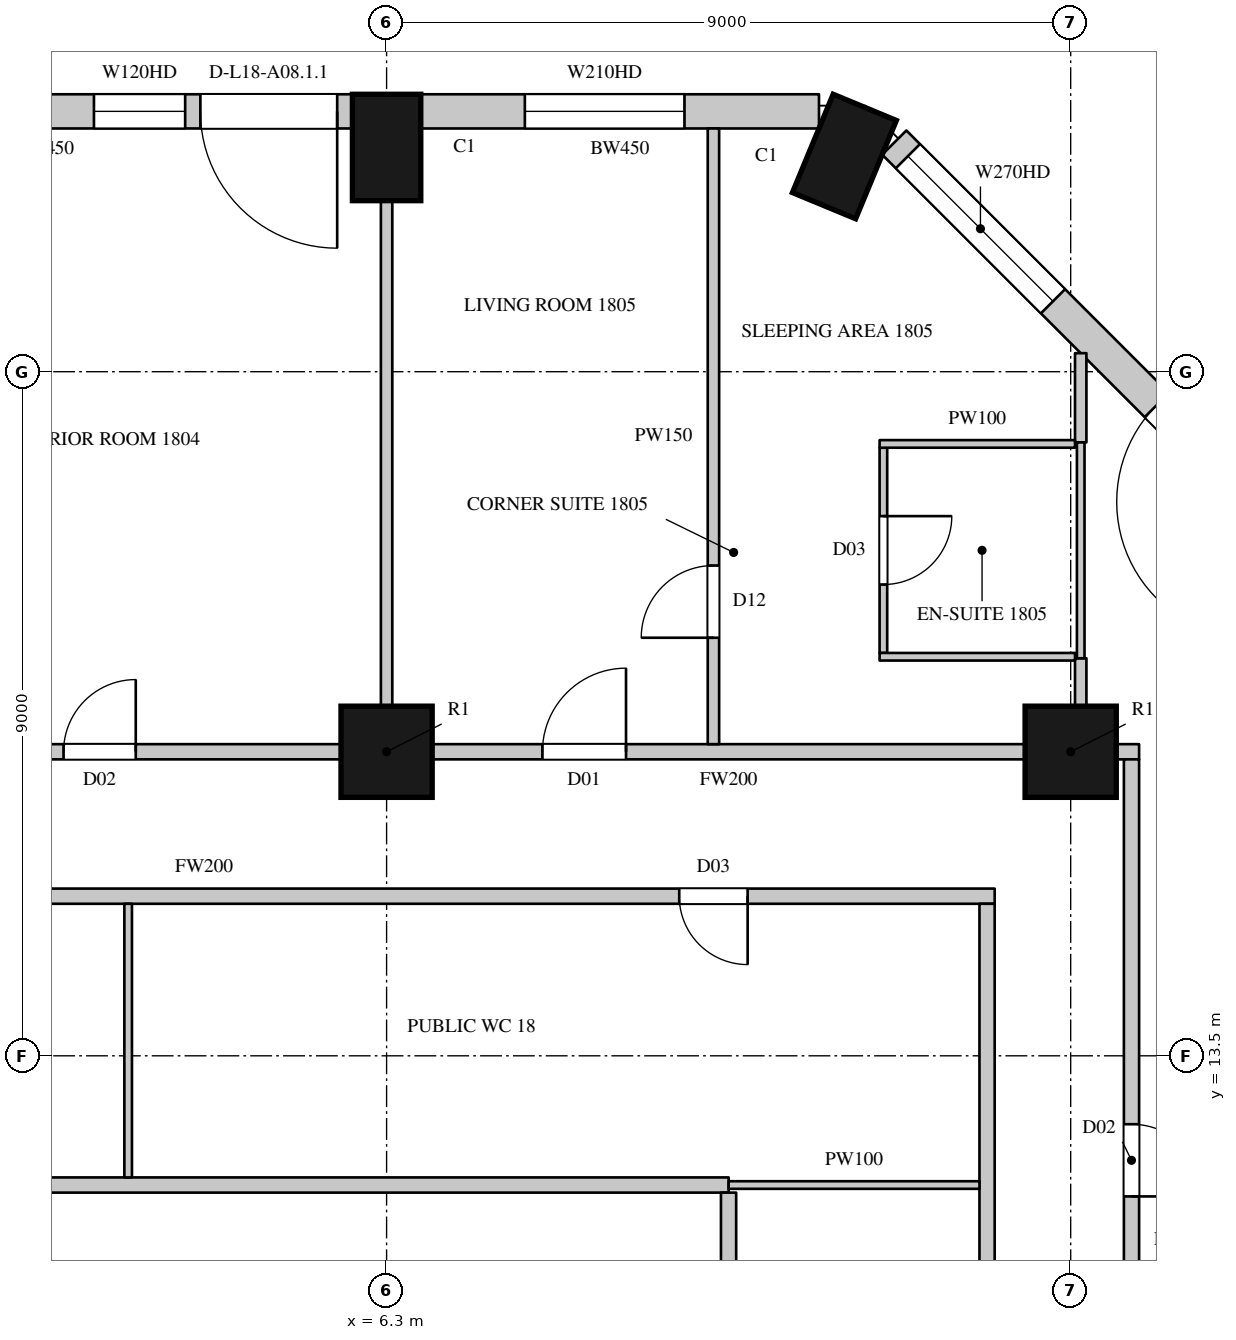
"""IFC4 building model, lengths in metres.
Left out: names, types, materials, properties, quantities, classifications, styles, units other than length and angle.
Written with IfcOpenShell. Run it as: python <this file> out.ifc"""

import sys

from ifc_helpers import new_model, si_unit, direction, frame, frame_2d, origin, origin_2d, place, context, subcontext, project, spatial, rectangle, circle, extrude, element, fill, save


model = new_model("IFC4")
c1 = context("Model", 3, precision=1e-05, world=origin(), true_north=direction((0.0, 1.0)))
c2 = subcontext(c1, "Body", "Model", "MODEL_VIEW")
j1 = project(units=[si_unit("LENGTHUNIT", "METRE"), si_unit("PLANEANGLEUNIT", "RADIAN")], contexts=[c1])
p1 = place(None, origin())
s1 = spatial("IfcSite", under=j1, at=p1, CompositionType="ELEMENT")
p2 = place(p1, origin())
s2 = spatial("IfcBuilding", under=s1, at=p2, CompositionType="ELEMENT")
p3 = place(p2, frame((0.0, 0.0, 95.1)))
s3 = spatial("IfcBuildingStorey", under=s2, at=p3, CompositionType="ELEMENT", Elevation=95.1)
for number, where, z_axis, x_axis in (
    (1, (12.323, 25.331, 0.0), (0.0, 0.0, 1.0), (-0.924, 0.383, 0.0)),
    (2, (6.3, 25.45, 0.0), (0.0, 0.0, 1.0), (-1.0, 0.0, 0.0)),
):
    element("IfcColumn", number, at=place(p3, frame(where, z_axis=z_axis, x_axis=x_axis)), inside=s3, PredefinedType="COLUMN", context=c2, shape_type="SweptSolid", body=[
        extrude(rectangle(XDim=0.9, YDim=1.4, at=origin_2d()), origin(), (0.0, 0.0, 1.0), 3.6),
    ])
for number, where, z_axis, x_axis in (
    (3, (6.3, 17.5, 0.0), (0.0, 0.0, 1.0), (1.0, 0.0, 0.0)),
    (4, (15.3, 17.5, 0.0), (0.0, 0.0, 1.0), (1.0, 0.0, 0.0)),
):
    element("IfcColumn", number, at=place(p3, frame(where, z_axis=z_axis, x_axis=x_axis)), inside=s3, PredefinedType="COLUMN", context=c2, shape_type="SweptSolid", body=[
        extrude(circle(Radius=0.6, at=origin_2d()), origin(), (0.0, 0.0, 1.0), 3.6),
    ])
p4 = place(p3, frame((18.229, 20.265, 0.0), z_axis=(0.0, 0.0, 1.0), x_axis=(-0.707106781187, 0.707106781187, 0.0)))
e5 = element("IfcWall", 5, at=p4, inside=s3, PredefinedType="SOLIDWALL", context=c2, shape_type="SweptSolid", body=[
    extrude(rectangle(XDim=7.424, YDim=0.45, at=frame_2d((3.712, 0.0))), origin(), (0.0, 0.0, 1.0), 3.3),
])
p5 = place(p4, frame((0.74, 0.0, 0.0)))
e6 = element("IfcOpeningElement", 6, at=p5, cuts=e5, PredefinedType="OPENING", context=c2, shape_type="SweptSolid", body=[
    extrude(rectangle(XDim=1.8, YDim=2.4, at=frame_2d((0.9, 1.2))), frame((0.0, 0.235, 0.0), z_axis=(0.0, -1.0, 0.0), x_axis=(1.0, 0.0, 0.0)), (0.0, 0.0, 1.0), 0.47),
])
p6 = place(p4, frame((4.471, 0.0, 1.05)))
e7 = element("IfcOpeningElement", 7, at=p6, cuts=e5, PredefinedType="OPENING", context=c2, shape_type="SweptSolid", body=[
    extrude(rectangle(XDim=2.7, YDim=2.0, at=frame_2d((1.35, 1.0))), frame((0.0, 0.235, 0.0), z_axis=(0.0, -1.0, 0.0), x_axis=(1.0, 0.0, 0.0)), (0.0, 0.0, 1.0), 0.47),
])
p7 = place(p3, frame((11.989, 25.925, 0.0), z_axis=(0.0, 0.0, 1.0), x_axis=(-1.0, 0.0, 0.0)))
e8 = element("IfcWall", 8, at=p7, inside=s3, PredefinedType="SOLIDWALL", context=c2, shape_type="SweptSolid", body=[
    extrude(rectangle(XDim=5.239, YDim=0.45, at=frame_2d((2.619, 0.0))), origin(), (0.0, 0.0, 1.0), 3.3),
])
p8 = place(p7, frame((1.77, 0.0, 1.05)))
e9 = element("IfcOpeningElement", 9, at=p8, cuts=e8, PredefinedType="OPENING", context=c2, shape_type="SweptSolid", body=[
    extrude(rectangle(XDim=2.1, YDim=2.0, at=frame_2d((1.05, 1.0))), frame((0.0, 0.235, 0.0), z_axis=(0.0, -1.0, 0.0), x_axis=(1.0, 0.0, 0.0)), (0.0, 0.0, 1.0), 0.47),
])
p9 = place(p3, frame((5.85, 25.925, 0.0), z_axis=(0.0, 0.0, 1.0), x_axis=(-1.0, 0.0, 0.0)))
e10 = element("IfcWall", 10, at=p9, inside=s3, PredefinedType="SOLIDWALL", context=c2, shape_type="SweptSolid", body=[
    extrude(rectangle(XDim=8.1, YDim=0.45, at=frame_2d((4.05, 0.0))), origin(), (0.0, 0.0, 1.0), 3.3),
])
p10 = place(p9, frame((0.2, 0.0, 0.0)))
e11 = element("IfcOpeningElement", 11, at=p10, cuts=e10, PredefinedType="OPENING", context=c2, shape_type="SweptSolid", body=[
    extrude(rectangle(XDim=1.8, YDim=2.4, at=frame_2d((0.9, 1.2))), frame((0.0, 0.235, 0.0), z_axis=(0.0, -1.0, 0.0), x_axis=(1.0, 0.0, 0.0)), (0.0, 0.0, 1.0), 0.47),
])
p11 = place(p9, frame((2.2, 0.0, 1.05)))
e12 = element("IfcOpeningElement", 12, at=p11, cuts=e10, PredefinedType="OPENING", context=c2, shape_type="SweptSolid", body=[
    extrude(rectangle(XDim=1.2, YDim=2.0, at=frame_2d((0.6, 1.0))), frame((0.0, 0.235, 0.0), z_axis=(0.0, -1.0, 0.0), x_axis=(1.0, 0.0, 0.0)), (0.0, 0.0, 1.0), 0.47),
])
p12 = place(p9, frame((4.7, 0.0, 0.0)))
e13 = element("IfcOpeningElement", 13, at=p12, cuts=e10, PredefinedType="OPENING", context=c2, shape_type="SweptSolid", body=[
    extrude(rectangle(XDim=1.8, YDim=2.4, at=frame_2d((0.9, 1.2))), frame((0.0, 0.235, 0.0), z_axis=(0.0, -1.0, 0.0), x_axis=(1.0, 0.0, 0.0)), (0.0, 0.0, 1.0), 0.47),
])
p13 = place(p9, frame((6.7, 0.0, 1.05)))
e14 = element("IfcOpeningElement", 14, at=p13, cuts=e10, PredefinedType="OPENING", context=c2, shape_type="SweptSolid", body=[
    extrude(rectangle(XDim=1.2, YDim=2.0, at=frame_2d((0.6, 1.0))), frame((0.0, 0.235, 0.0), z_axis=(0.0, -1.0, 0.0), x_axis=(1.0, 0.0, 0.0)), (0.0, 0.0, 1.0), 0.47),
])
p14 = place(p3, frame((16.486, 23.529, 0.0), z_axis=(0.0, 0.0, 1.0), x_axis=(-0.707022305137, 0.707191247145, 0.0)))
e15 = element("IfcWall", 15, at=p14, inside=s3, PredefinedType="SOLIDWALL", context=c2, shape_type="SweptSolid", body=[
    extrude(rectangle(XDim=1.445, YDim=0.45, at=frame_2d((0.723, 0.0))), origin(), (0.0, 0.0, 1.0), 0.6),
])
p15 = place(p3, frame((-2.1, 17.5, 0.0), z_axis=(0.0, 0.0, 1.0), x_axis=(1.0, 0.0, 0.0)))
e16 = element("IfcWall", 16, at=p15, inside=s3, PredefinedType="PARTITIONING", context=c2, shape_type="SweptSolid", body=[
    extrude(rectangle(XDim=7.8, YDim=0.2, at=frame_2d((3.9, 0.0))), origin(), (0.0, 0.0, 1.0), 2.75),
])
p16 = place(p15, frame((4.15, 0.0, 0.0)))
e17 = element("IfcOpeningElement", 17, at=p16, cuts=e16, PredefinedType="OPENING", context=c2, shape_type="SweptSolid", body=[
    extrude(rectangle(XDim=0.95, YDim=2.2, at=frame_2d((0.475, 1.1))), frame((0.0, 0.11, 0.0), z_axis=(0.0, -1.0, 0.0), x_axis=(1.0, 0.0, 0.0)), (0.0, 0.0, 1.0), 0.22),
])
p17 = place(p3, frame((6.9, 17.5, 0.0), z_axis=(0.0, 0.0, 1.0), x_axis=(1.0, 0.0, 0.0)))
e18 = element("IfcWall", 18, at=p17, inside=s3, PredefinedType="PARTITIONING", context=c2, shape_type="SweptSolid", body=[
    extrude(rectangle(XDim=7.8, YDim=0.2, at=frame_2d((3.9, 0.0))), origin(), (0.0, 0.0, 1.0), 2.75),
])
p18 = place(p17, frame((1.45, 0.0, 0.0)))
e19 = element("IfcOpeningElement", 19, at=p18, cuts=e18, PredefinedType="OPENING", context=c2, shape_type="SweptSolid", body=[
    extrude(rectangle(XDim=1.1, YDim=2.4, at=frame_2d((0.55, 1.2))), frame((0.0, 0.11, 0.0), z_axis=(0.0, -1.0, 0.0), x_axis=(1.0, 0.0, 0.0)), (0.0, 0.0, 1.0), 0.22),
])
p19 = place(p3, frame((15.9, 17.5, 0.0), z_axis=(0.0, 0.0, 1.0), x_axis=(1.0, 0.0, 0.0)))
e20 = element("IfcWall", 20, at=p19, inside=s3, PredefinedType="PARTITIONING", context=c2, shape_type="SweptSolid", body=[
    extrude(rectangle(XDim=0.3, YDim=0.2, at=frame_2d((0.15, 0.0))), origin(), (0.0, 0.0, 1.0), 3.3),
])
p20 = place(p3, frame((-8.9, 11.8, 0.0), z_axis=(0.0, 0.0, 1.0), x_axis=(1.0, 0.0, 0.0)))
e21 = element("IfcWall", 21, at=p20, inside=s3, PredefinedType="PARTITIONING", context=c2, shape_type="SweptSolid", body=[
    extrude(rectangle(XDim=19.7, YDim=0.2, at=frame_2d((9.85, 0.0))), origin(), (0.0, 0.0, 1.0), 3.3),
])
p21 = place(p20, frame((0.8, 0.0, 0.0)))
e22 = element("IfcOpeningElement", 22, at=p21, cuts=e21, PredefinedType="OPENING", context=c2, shape_type="SweptSolid", body=[
    extrude(rectangle(XDim=1.5, YDim=2.2, at=frame_2d((0.75, 1.1))), frame((0.0, 0.11, 0.0), z_axis=(0.0, -1.0, 0.0), x_axis=(1.0, 0.0, 0.0)), (0.0, 0.0, 1.0), 0.22),
])
p22 = place(p3, frame((-6.5, 15.6, 0.0), z_axis=(0.0, 0.0, 1.0), x_axis=(1.0, 0.0, 0.0)))
e23 = element("IfcWall", 23, at=p22, inside=s3, PredefinedType="PARTITIONING", context=c2, shape_type="SweptSolid", body=[
    extrude(rectangle(XDim=20.8, YDim=0.2, at=frame_2d((10.4, 0.0))), origin(), (0.0, 0.0, 1.0), 3.3),
])
p23 = place(p22, frame((6.5, 0.0, 0.0)))
e24 = element("IfcOpeningElement", 24, at=p23, cuts=e23, PredefinedType="OPENING", context=c2, shape_type="SweptSolid", body=[
    extrude(rectangle(XDim=0.9, YDim=2.2, at=frame_2d((0.45, 1.1))), frame((0.0, 0.11, 0.0), z_axis=(0.0, -1.0, 0.0), x_axis=(1.0, 0.0, 0.0)), (0.0, 0.0, 1.0), 0.22),
])
p24 = place(p22, frame((16.65, 0.0, 0.0)))
e25 = element("IfcOpeningElement", 25, at=p24, cuts=e23, PredefinedType="OPENING", context=c2, shape_type="SweptSolid", body=[
    extrude(rectangle(XDim=0.9, YDim=2.2, at=frame_2d((0.45, 1.1))), frame((0.0, 0.11, 0.0), z_axis=(0.0, -1.0, 0.0), x_axis=(1.0, 0.0, 0.0)), (0.0, 0.0, 1.0), 0.22),
])
p25 = place(p3, frame((10.799, -12.5, 0.0), z_axis=(0.0, 0.0, 1.0), x_axis=(0.0, 1.0, 0.0)))
e26 = element("IfcWall", 26, at=p25, inside=s3, PredefinedType="PARTITIONING", context=c2, shape_type="SweptSolid", body=[
    extrude(rectangle(XDim=24.2, YDim=0.2, at=frame_2d((12.1, 0.0))), origin(), (0.0, 0.0, 1.0), 3.3),
])
p26 = place(p25, frame((13.15, 0.0, 0.0)))
e27 = element("IfcOpeningElement", 27, at=p26, cuts=e26, PredefinedType="OPENING", context=c2, shape_type="SweptSolid", body=[
    extrude(rectangle(XDim=1.5, YDim=2.2, at=frame_2d((0.75, 1.1))), frame((0.0, 0.11, 0.0), z_axis=(0.0, -1.0, 0.0), x_axis=(1.0, 0.0, 0.0)), (0.0, 0.0, 1.0), 0.22),
])
p27 = place(p3, frame((14.2, 6.825, 0.0), z_axis=(0.0, 0.0, 1.0), x_axis=(0.0, 1.0, 0.0)))
e28 = element("IfcWall", 28, at=p27, inside=s3, PredefinedType="PARTITIONING", context=c2, shape_type="SweptSolid", body=[
    extrude(rectangle(XDim=8.675, YDim=0.2, at=frame_2d((4.337, 0.0))), origin(), (0.0, 0.0, 1.0), 3.3),
])
p28 = place(p3, frame((16.1, 4.75, 0.0), z_axis=(0.0, 0.0, 1.0), x_axis=(0.0, 1.0, 0.0)))
e29 = element("IfcWall", 29, at=p28, inside=s3, PredefinedType="PARTITIONING", context=c2, shape_type="SweptSolid", body=[
    extrude(rectangle(XDim=12.65, YDim=0.2, at=frame_2d((6.325, 0.0))), origin(), (0.0, 0.0, 1.0), 3.3),
])
p29 = place(p28, frame((0.5, 0.0, 0.0)))
e30 = element("IfcOpeningElement", 30, at=p29, cuts=e29, PredefinedType="OPENING", context=c2, shape_type="SweptSolid", body=[
    extrude(rectangle(XDim=0.95, YDim=2.2, at=frame_2d((0.475, 1.1))), frame((0.0, 0.11, 0.0), z_axis=(0.0, -1.0, 0.0), x_axis=(1.0, 0.0, 0.0)), (0.0, 0.0, 1.0), 0.22),
])
p30 = place(p28, frame((6.9, 0.0, 0.0)))
e31 = element("IfcOpeningElement", 31, at=p30, cuts=e29, PredefinedType="OPENING", context=c2, shape_type="SweptSolid", body=[
    extrude(rectangle(XDim=0.95, YDim=2.2, at=frame_2d((0.475, 1.1))), frame((0.0, 0.11, 0.0), z_axis=(0.0, -1.0, 0.0), x_axis=(1.0, 0.0, 0.0)), (0.0, 0.0, 1.0), 0.22),
])
p31 = place(p3, frame((6.3, 18.1, 0.0), z_axis=(0.0, 0.0, 1.0), x_axis=(0.0, 1.0, 0.0)))
e32 = element("IfcWall", 32, at=p31, inside=s3, PredefinedType="PARTITIONING", context=c2, shape_type="SweptSolid", body=[
    extrude(rectangle(XDim=6.65, YDim=0.15, at=frame_2d((3.325, 0.0))), origin(), (0.0, 0.0, 1.0), 2.75),
])
p32 = place(p3, frame((10.6, 17.6, 0.0), z_axis=(0.0, 0.0, 1.0), x_axis=(0.0, 1.0, 0.0)))
e33 = element("IfcWall", 33, at=p32, inside=s3, PredefinedType="PARTITIONING", context=c2, shape_type="SweptSolid", body=[
    extrude(rectangle(XDim=8.1, YDim=0.15, at=frame_2d((4.05, 0.0))), origin(), (0.0, 0.0, 1.0), 3.3),
])
p33 = place(p32, frame((1.4, 0.0, 0.0)))
e34 = element("IfcOpeningElement", 34, at=p33, cuts=e33, PredefinedType="OPENING", context=c2, shape_type="SweptSolid", body=[
    extrude(rectangle(XDim=0.95, YDim=2.2, at=frame_2d((0.475, 1.1))), frame((0.0, 0.085, 0.0), z_axis=(0.0, -1.0, 0.0), x_axis=(1.0, 0.0, 0.0)), (0.0, 0.0, 1.0), 0.17),
])
p34 = place(p3, frame((15.432, 18.094, 0.0), z_axis=(0.0, 0.0, 1.0), x_axis=(0.0, 1.0, 0.0)))
e35 = element("IfcWall", 35, at=p34, inside=s3, PredefinedType="PARTITIONING", context=c2, shape_type="SweptSolid", body=[
    extrude(rectangle(XDim=0.636, YDim=0.15, at=frame_2d((0.318, 0.0))), origin(), (0.0, 0.0, 1.0), 3.3),
])
p35 = place(p3, frame((15.432, 21.57, 0.0), z_axis=(0.0, 0.0, 1.0), x_axis=(0.0, 1.0, 0.0)))
e36 = element("IfcWall", 36, at=p35, inside=s3, PredefinedType="PARTITIONING", context=c2, shape_type="SweptSolid", body=[
    extrude(rectangle(XDim=1.174, YDim=0.15, at=frame_2d((0.587, 0.0))), origin(), (0.0, 0.0, 1.0), 3.3),
])
p36 = place(p3, frame((2.9, 11.9, 0.0), z_axis=(0.0, 0.0, 1.0), x_axis=(0.0, 1.0, 0.0)))
e37 = element("IfcWall", 37, at=p36, inside=s3, PredefinedType="PARTITIONING", context=c2, shape_type="SweptSolid", body=[
    extrude(rectangle(XDim=3.6, YDim=0.1, at=frame_2d((1.8, 0.0))), origin(), (0.0, 0.0, 1.0), 3.3),
])
p37 = place(p3, frame((10.8, 11.8, 0.0), z_axis=(0.0, 0.0, 1.0), x_axis=(1.0, 0.0, 0.0)))
e38 = element("IfcWall", 38, at=p37, inside=s3, PredefinedType="PARTITIONING", context=c2, shape_type="SweptSolid", body=[
    extrude(rectangle(XDim=3.3, YDim=0.1, at=frame_2d((1.65, 0.0))), origin(), (0.0, 0.0, 1.0), 3.3),
])
p38 = place(p3, frame((12.836, 18.8, 0.0), z_axis=(0.0, 0.0, 1.0), x_axis=(0.0, 1.0, 0.0)))
e39 = element("IfcWall", 39, at=p38, inside=s3, PredefinedType="PARTITIONING", context=c2, shape_type="SweptSolid", body=[
    extrude(rectangle(XDim=2.7, YDim=0.1, at=frame_2d((1.35, 0.0))), origin(), (0.0, 0.0, 1.0), 3.3),
])
p39 = place(p38, frame((0.9, 0.0, 0.0)))
e40 = element("IfcOpeningElement", 40, at=p39, cuts=e39, PredefinedType="OPENING", context=c2, shape_type="SweptSolid", body=[
    extrude(rectangle(XDim=0.9, YDim=2.2, at=frame_2d((0.45, 1.1))), frame((0.0, 0.06, 0.0), z_axis=(0.0, -1.0, 0.0), x_axis=(1.0, 0.0, 0.0)), (0.0, 0.0, 1.0), 0.12),
])
for number, where, z_axis, x_axis in (
    (41, (12.786, 18.75, 0.0), (0.0, 0.0, 1.0), (1.0, 0.0, 0.0)),
    (42, (12.786, 21.55, 0.0), (0.0, 0.0, 1.0), (1.0, 0.0, 0.0)),
):
    element("IfcWall", number, at=place(p3, frame(where, z_axis=z_axis, x_axis=x_axis)), inside=s3, PredefinedType="PARTITIONING", context=c2, shape_type="SweptSolid", body=[
        extrude(rectangle(XDim=2.571, YDim=0.1, at=frame_2d((1.286, 0.0))), origin(), (0.0, 0.0, 1.0), 3.3),
    ])
p40 = place(p3, frame((15.432, 18.73, 0.0), z_axis=(0.0, 0.0, 1.0), x_axis=(0.0, 1.0, 0.0)))
e43 = element("IfcWall", 43, at=p40, inside=s3, PredefinedType="PARTITIONING", context=c2, shape_type="SweptSolid", body=[
    extrude(rectangle(XDim=2.84, YDim=0.1, at=frame_2d((1.42, 0.0))), origin(), (0.0, 0.0, 1.0), 3.3),
])
p41 = place(p5, origin())
e44 = element("IfcDoor", 44, at=p41, inside=s3, OperationType="SLIDING_TO_LEFT", PredefinedType="DOOR", context=c2, shape_type="SweptSolid", body=[
    extrude(rectangle(XDim=1.8, YDim=2.4, at=frame_2d((0.9, 1.2))), frame((0.0, 0.13, 0.0), z_axis=(0.0, -1.0, 0.0), x_axis=(1.0, 0.0, 0.0)), (0.0, 0.0, 1.0), 0.05),
])
fill(e6, e44)
p42 = place(p6, origin())
e45 = element("IfcWindow", 45, at=p42, inside=s3, PartitioningType="SINGLE_PANEL", PredefinedType="WINDOW", context=c2, shape_type="SweptSolid", body=[
    extrude(rectangle(XDim=2.7, YDim=2.0, at=frame_2d((1.35, 1.0))), frame((0.0, 0.135, 0.0), z_axis=(0.0, -1.0, 0.0), x_axis=(1.0, 0.0, 0.0)), (0.0, 0.0, 1.0), 0.06),
])
fill(e7, e45)
p43 = place(p10, origin())
e46 = element("IfcDoor", 46, at=p43, inside=s3, OperationType="SLIDING_TO_LEFT", PredefinedType="DOOR", context=c2, shape_type="SweptSolid", body=[
    extrude(rectangle(XDim=1.8, YDim=2.4, at=frame_2d((0.9, 1.2))), frame((0.0, 0.13, 0.0), z_axis=(0.0, -1.0, 0.0), x_axis=(1.0, 0.0, 0.0)), (0.0, 0.0, 1.0), 0.05),
])
fill(e11, e46)
p44 = place(p11, origin())
e47 = element("IfcWindow", 47, at=p44, inside=s3, PartitioningType="SINGLE_PANEL", PredefinedType="WINDOW", context=c2, shape_type="SweptSolid", body=[
    extrude(rectangle(XDim=1.2, YDim=2.0, at=frame_2d((0.6, 1.0))), frame((0.0, 0.135, 0.0), z_axis=(0.0, -1.0, 0.0), x_axis=(1.0, 0.0, 0.0)), (0.0, 0.0, 1.0), 0.06),
])
fill(e12, e47)
p45 = place(p24, origin())
e48 = element("IfcDoor", 48, at=p45, inside=s3, OperationType="SINGLE_SWING_LEFT", PredefinedType="DOOR", context=c2, shape_type="SweptSolid", body=[
    extrude(rectangle(XDim=0.9, YDim=2.2, at=frame_2d((0.45, 1.1))), frame((0.0, 0.025, 0.0), z_axis=(0.0, -1.0, 0.0), x_axis=(1.0, 0.0, 0.0)), (0.0, 0.0, 1.0), 0.05),
])
fill(e25, e48)
p46 = place(p16, origin())
e49 = element("IfcDoor", 49, at=p46, inside=s3, OperationType="SINGLE_SWING_RIGHT", PredefinedType="DOOR", context=c2, shape_type="SweptSolid", body=[
    extrude(rectangle(XDim=0.95, YDim=2.2, at=frame_2d((0.475, 1.1))), frame((0.0, 0.025, 0.0), z_axis=(0.0, -1.0, 0.0), x_axis=(1.0, 0.0, 0.0)), (0.0, 0.0, 1.0), 0.05),
])
fill(e17, e49)
p47 = place(p18, origin())
e50 = element("IfcDoor", 50, at=p47, inside=s3, OperationType="SINGLE_SWING_RIGHT", PredefinedType="DOOR", context=c2, shape_type="SweptSolid", body=[
    extrude(rectangle(XDim=1.1, YDim=2.4, at=frame_2d((0.55, 1.2))), frame((0.0, 0.025, 0.0), z_axis=(0.0, -1.0, 0.0), x_axis=(1.0, 0.0, 0.0)), (0.0, 0.0, 1.0), 0.05),
])
fill(e19, e50)
p48 = place(p33, origin())
e51 = element("IfcDoor", 51, at=p48, inside=s3, OperationType="SINGLE_SWING_LEFT", PredefinedType="DOOR", context=c2, shape_type="SweptSolid", body=[
    extrude(rectangle(XDim=0.95, YDim=2.2, at=frame_2d((0.475, 1.1))), frame((0.0, 0.025, 0.0), z_axis=(0.0, -1.0, 0.0), x_axis=(1.0, 0.0, 0.0)), (0.0, 0.0, 1.0), 0.05),
])
fill(e34, e51)
p49 = place(p39, origin())
e52 = element("IfcDoor", 52, at=p49, inside=s3, OperationType="SINGLE_SWING_LEFT", PredefinedType="DOOR", context=c2, shape_type="SweptSolid", body=[
    extrude(rectangle(XDim=0.9, YDim=2.2, at=frame_2d((0.45, 1.1))), frame((0.0, 0.025, 0.0), z_axis=(0.0, -1.0, 0.0), x_axis=(1.0, 0.0, 0.0)), (0.0, 0.0, 1.0), 0.05),
])
fill(e40, e52)
p50 = place(p30, origin())
e53 = element("IfcDoor", 53, at=p50, inside=s3, OperationType="SINGLE_SWING_RIGHT", PredefinedType="DOOR", context=c2, shape_type="SweptSolid", body=[
    extrude(rectangle(XDim=0.95, YDim=2.2, at=frame_2d((0.475, 1.1))), frame((0.0, 0.025, 0.0), z_axis=(0.0, -1.0, 0.0), x_axis=(1.0, 0.0, 0.0)), (0.0, 0.0, 1.0), 0.05),
])
fill(e31, e53)
p51 = place(p8, origin())
e54 = element("IfcWindow", 54, at=p51, inside=s3, PartitioningType="SINGLE_PANEL", PredefinedType="WINDOW", context=c2, shape_type="SweptSolid", body=[
    extrude(rectangle(XDim=2.1, YDim=2.0, at=frame_2d((1.05, 1.0))), frame((0.0, 0.135, 0.0), z_axis=(0.0, -1.0, 0.0), x_axis=(1.0, 0.0, 0.0)), (0.0, 0.0, 1.0), 0.06),
])
fill(e9, e54)
save(model, sys.argv[1])
